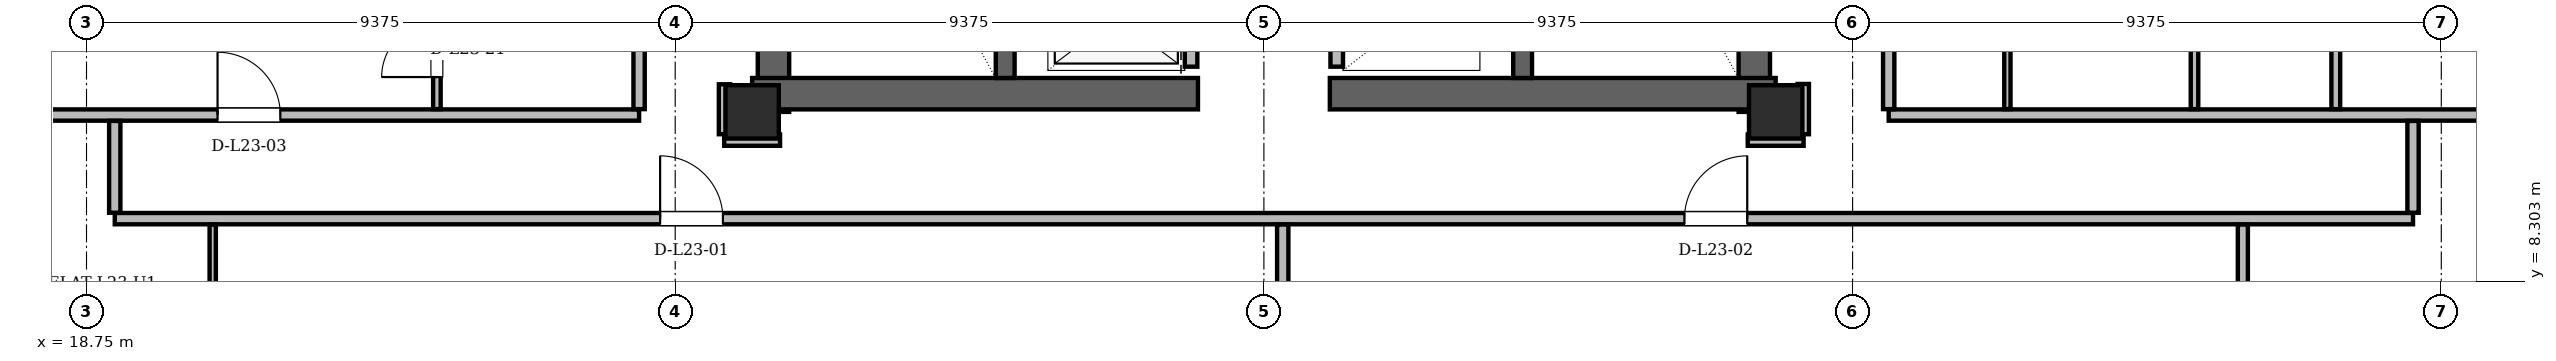
"""IFC4 building model, lengths in metres.
Left out: names, types, materials, properties, quantities, classifications, styles, units other than length and angle.
Written with IfcOpenShell. Run it as: python <this file> out.ifc"""

import sys

from ifc_helpers import new_model, si_unit, direction, frame, frame_2d, origin, origin_2d, place, context, subcontext, project, spatial, rectangle, hollow_rectangle, extrude, element, fill, save


model = new_model("IFC4")
c1 = context("Model", 3, precision=1e-05, world=origin(), true_north=direction((0.0, 1.0)))
c2 = subcontext(c1, "Body", "Model", "MODEL_VIEW")
j1 = project(units=[si_unit("LENGTHUNIT", "METRE"), si_unit("PLANEANGLEUNIT", "RADIAN")], contexts=[c1])
p1 = place(None, origin())
s1 = spatial("IfcSite", under=j1, at=p1, CompositionType="ELEMENT")
p2 = place(p1, origin())
s2 = spatial("IfcBuilding", under=s1, at=p2, CompositionType="ELEMENT")
p3 = place(p2, frame((0.0, 0.0, 89.7)))
s3 = spatial("IfcBuildingStorey", under=s2, at=p3, CompositionType="ELEMENT", Elevation=89.7)
for number, where, z_axis, x_axis in (
    (1, (29.35, 11.0, 0.0), (0.0, 0.0, 1.0), (1.0, 0.0, 0.0)),
    (2, (45.65, 11.0, 0.0), (0.0, 0.0, 1.0), (1.0, 0.0, 0.0)),
):
    element("IfcColumn", number, at=place(p3, frame(where, z_axis=z_axis, x_axis=x_axis)), inside=s3, PredefinedType="COLUMN", context=c2, shape_type="SweptSolid", body=[
        extrude(hollow_rectangle(XDim=0.85, YDim=0.85, WallThickness=0.07, at=origin_2d()), origin(), (0.0, 0.0, 1.0), 3.6),
    ])
for number, where, z_axis, x_axis in (
    (3, (29.69, 11.0, 0.0), (0.0, 0.0, 1.0), (0.0, 1.0, 0.0)),
    (4, (45.31, 11.0, 0.0), (0.0, 0.0, 1.0), (0.0, 1.0, 0.0)),
):
    element("IfcWall", number, at=place(p3, frame(where, z_axis=z_axis, x_axis=x_axis)), inside=s3, PredefinedType="SHEAR", context=c2, shape_type="SweptSolid", body=[
        extrude(rectangle(XDim=13.3, YDim=0.5, at=frame_2d((6.65, 0.0))), origin(), (0.0, 0.0, 1.0), 3.36),
    ])
for number, where, z_axis, x_axis in (
    (5, (29.35, 11.29, 0.0), (0.0, 0.0, 1.0), (1.0, 0.0, 0.0)),
    (6, (38.55, 11.29, 0.0), (0.0, 0.0, 1.0), (1.0, 0.0, 0.0)),
):
    element("IfcWall", number, at=place(p3, frame(where, z_axis=z_axis, x_axis=x_axis)), inside=s3, PredefinedType="SHEAR", context=c2, shape_type="SweptSolid", body=[
        extrude(rectangle(XDim=7.1, YDim=0.5, at=frame_2d((3.55, 0.0))), origin(), (0.0, 0.0, 1.0), 3.36),
    ])
for number, where, z_axis, x_axis in (
    (7, (33.38, 11.54, 0.0), (0.0, 0.0, 1.0), (0.0, 1.0, 0.0)),
    (8, (41.62, 11.54, 0.0), (0.0, 0.0, 1.0), (0.0, 1.0, 0.0)),
):
    element("IfcWall", number, at=place(p3, frame(where, z_axis=z_axis, x_axis=x_axis)), inside=s3, PredefinedType="SHEAR", context=c2, shape_type="SweptSolid", body=[
        extrude(rectangle(XDim=7.62, YDim=0.3, at=frame_2d((3.81, 0.0))), origin(), (0.0, 0.0, 1.0), 3.36),
    ])
for number, where, z_axis, x_axis in (
    (9, (14.14, 13.798, 0.0), (0.0, 0.0, 1.0), (0.5, -0.866, 0.0)),
    (10, (54.637, 3.021, 0.0), (0.0, 0.0, 1.0), (0.5, 0.866, 0.0)),
):
    element("IfcWall", number, at=place(p3, frame(where, z_axis=z_axis, x_axis=x_axis)), inside=s3, PredefinedType="SOLIDWALL", context=c2, shape_type="SweptSolid", body=[
        extrude(rectangle(XDim=12.445, YDim=0.34, at=frame_2d((6.223, 0.0))), origin(), (0.0, 0.0, 1.0), 2.578),
    ])
p4 = place(p3, frame((36.34, 11.72, 0.0), z_axis=(0.0, 0.0, 1.0), x_axis=(0.0, 1.0, 0.0)))
e11 = element("IfcWall", 11, at=p4, inside=s3, PredefinedType="PARTITIONING", context=c2, shape_type="SweptSolid", body=[
    extrude(rectangle(XDim=7.6, YDim=0.2, at=frame_2d((3.8, 0.0))), origin(), (0.0, 0.0, 1.0), 3.36),
])
p5 = place(p4, frame((0.255, 0.0, 0.0)))
e12 = element("IfcOpeningElement", 12, at=p5, cuts=e11, PredefinedType="OPENING", context=c2, shape_type="SweptSolid", body=[
    extrude(rectangle(XDim=1.05, YDim=2.15, at=frame_2d((0.525, 1.075))), frame((0.0, 0.1, 0.0), z_axis=(0.0, -1.0, 0.0), x_axis=(1.0, 0.0, 0.0)), (0.0, 0.0, 1.0), 0.2),
])
p6 = place(p4, frame((2.105, 0.0, 0.0)))
e13 = element("IfcOpeningElement", 13, at=p6, cuts=e11, PredefinedType="OPENING", context=c2, shape_type="SweptSolid", body=[
    extrude(rectangle(XDim=1.05, YDim=2.15, at=frame_2d((0.525, 1.075))), frame((0.0, 0.1, 0.0), z_axis=(0.0, -1.0, 0.0), x_axis=(1.0, 0.0, 0.0)), (0.0, 0.0, 1.0), 0.2),
])
p7 = place(p4, frame((3.955, 0.0, 0.0)))
e14 = element("IfcOpeningElement", 14, at=p7, cuts=e11, PredefinedType="OPENING", context=c2, shape_type="SweptSolid", body=[
    extrude(rectangle(XDim=1.05, YDim=2.15, at=frame_2d((0.525, 1.075))), frame((0.0, 0.1, 0.0), z_axis=(0.0, -1.0, 0.0), x_axis=(1.0, 0.0, 0.0)), (0.0, 0.0, 1.0), 0.2),
])
p8 = place(p3, frame((38.66, 11.72, 0.0), z_axis=(0.0, 0.0, 1.0), x_axis=(0.0, 1.0, 0.0)))
e15 = element("IfcWall", 15, at=p8, inside=s3, PredefinedType="PARTITIONING", context=c2, shape_type="SweptSolid", body=[
    extrude(rectangle(XDim=9.1, YDim=0.2, at=frame_2d((4.55, 0.0))), origin(), (0.0, 0.0, 1.0), 3.36),
])
p9 = place(p3, frame((19.2, 9.3, 0.0), z_axis=(0.0, 0.0, 1.0), x_axis=(1.0, 0.0, 0.0)))
e16 = element("IfcWall", 16, at=p9, inside=s3, PredefinedType="PARTITIONING", context=c2, shape_type="SweptSolid", body=[
    extrude(rectangle(XDim=36.6, YDim=0.18, at=frame_2d((18.3, 0.0))), origin(), (0.0, 0.0, 1.0), 2.814),
])
p10 = place(p9, frame((8.685, 0.0, 0.0)))
e17 = element("IfcOpeningElement", 17, at=p10, cuts=e16, PredefinedType="OPENING", context=c2, shape_type="SweptSolid", body=[
    extrude(rectangle(XDim=1.0, YDim=2.18, at=frame_2d((0.5, 1.09))), frame((0.0, 0.09, 0.0), z_axis=(0.0, -1.0, 0.0), x_axis=(1.0, 0.0, 0.0)), (0.0, 0.0, 1.0), 0.18),
])
p11 = place(p9, frame((24.997, 0.0, 0.0)))
e18 = element("IfcOpeningElement", 18, at=p11, cuts=e16, PredefinedType="OPENING", context=c2, shape_type="SweptSolid", body=[
    extrude(rectangle(XDim=1.0, YDim=2.18, at=frame_2d((0.5, 1.09))), frame((0.0, 0.09, 0.0), z_axis=(0.0, -1.0, 0.0), x_axis=(1.0, 0.0, 0.0)), (0.0, 0.0, 1.0), 0.18),
])
for number, where, z_axis, x_axis in (
    (19, (28.905, 10.55, 0.0), (0.0, 0.0, 1.0), (1.0, 0.0, 0.0)),
    (20, (45.205, 10.55, 0.0), (0.0, 0.0, 1.0), (1.0, 0.0, 0.0)),
):
    element("IfcWall", number, at=place(p3, frame(where, z_axis=z_axis, x_axis=x_axis)), inside=s3, PredefinedType="PARTITIONING", context=c2, shape_type="SweptSolid", body=[
        extrude(rectangle(XDim=0.89, YDim=0.18, at=frame_2d((0.445, 0.0))), origin(), (0.0, 0.0, 1.0), 3.36),
    ])
p12 = place(p3, frame((15.986, 10.95, 0.0), z_axis=(0.0, 0.0, 1.0), x_axis=(1.0, 0.0, 0.0)))
e21 = element("IfcWall", 21, at=p12, inside=s3, PredefinedType="PARTITIONING", context=c2, shape_type="SweptSolid", body=[
    extrude(rectangle(XDim=11.564, YDim=0.18, at=frame_2d((5.782, 0.0))), origin(), (0.0, 0.0, 1.0), 3.36),
])
p13 = place(p12, frame((4.851, 0.0, 0.0)))
e22 = element("IfcOpeningElement", 22, at=p13, cuts=e21, PredefinedType="OPENING", context=c2, shape_type="SweptSolid", body=[
    extrude(rectangle(XDim=1.0, YDim=2.18, at=frame_2d((0.5, 1.09))), frame((0.0, 0.09, 0.0), z_axis=(0.0, -1.0, 0.0), x_axis=(1.0, 0.0, 0.0)), (0.0, 0.0, 1.0), 0.18),
])
p14 = place(p3, frame((47.45, 10.95, 0.0), z_axis=(0.0, 0.0, 1.0), x_axis=(1.0, 0.0, 0.0)))
e23 = element("IfcWall", 23, at=p14, inside=s3, PredefinedType="PARTITIONING", context=c2, shape_type="SweptSolid", body=[
    extrude(rectangle(XDim=11.564, YDim=0.18, at=frame_2d((5.782, 0.0))), origin(), (0.0, 0.0, 1.0), 3.36),
])
p15 = place(p3, frame((19.2, 9.394, 0.0), z_axis=(0.0, 0.0, 1.0), x_axis=(0.0, 1.0, 0.0)))
e24 = element("IfcWall", 24, at=p15, inside=s3, PredefinedType="PARTITIONING", context=c2, shape_type="SweptSolid", body=[
    extrude(rectangle(XDim=1.462, YDim=0.18, at=frame_2d((0.731, 0.0))), origin(), (0.0, 0.0, 1.0), 3.36),
])
p16 = place(p3, frame((20.76, 3.195, 0.0), z_axis=(0.0, 0.0, 1.0), x_axis=(0.0, 1.0, 0.0)))
e25 = element("IfcWall", 25, at=p16, inside=s3, PredefinedType="PARTITIONING", context=c2, shape_type="SweptSolid", body=[
    extrude(rectangle(XDim=6.011, YDim=0.1, at=frame_2d((3.006, 0.0))), origin(), (0.0, 0.0, 1.0), 2.814),
])
p17 = place(p16, frame((2.601, 0.0, 0.0)))
e26 = element("IfcOpeningElement", 26, at=p17, cuts=e25, PredefinedType="OPENING", context=c2, shape_type="SweptSolid", body=[
    extrude(rectangle(XDim=0.88, YDim=2.08, at=frame_2d((0.44, 1.04))), frame((0.0, 0.05, 0.0), z_axis=(0.0, -1.0, 0.0), x_axis=(1.0, 0.0, 0.0)), (0.0, 0.0, 1.0), 0.1),
])
p18 = place(p3, frame((24.33, 11.044, 0.0), z_axis=(0.0, 0.0, 1.0), x_axis=(0.0, 1.0, 0.0)))
e27 = element("IfcWall", 27, at=p18, inside=s3, PredefinedType="PARTITIONING", context=c2, shape_type="SweptSolid", body=[
    extrude(rectangle(XDim=4.862, YDim=0.12, at=frame_2d((2.431, 0.0))), origin(), (0.0, 0.0, 1.0), 2.814),
])
p19 = place(p18, frame((0.511, 0.0, 0.0)))
e28 = element("IfcOpeningElement", 28, at=p19, cuts=e27, PredefinedType="OPENING", context=c2, shape_type="SweptSolid", body=[
    extrude(rectangle(XDim=0.88, YDim=2.08, at=frame_2d((0.44, 1.04))), frame((0.0, 0.06, 0.0), z_axis=(0.0, -1.0, 0.0), x_axis=(1.0, 0.0, 0.0)), (0.0, 0.0, 1.0), 0.12),
])
p20 = place(p18, frame((3.031, 0.0, 0.0)))
e29 = element("IfcOpeningElement", 29, at=p20, cuts=e27, PredefinedType="OPENING", context=c2, shape_type="SweptSolid", body=[
    extrude(rectangle(XDim=0.95, YDim=2.1, at=frame_2d((0.475, 1.05))), frame((0.0, 0.06, 0.0), z_axis=(0.0, -1.0, 0.0), x_axis=(1.0, 0.0, 0.0)), (0.0, 0.0, 1.0), 0.12),
])
p21 = place(p3, frame((27.55, 11.044, 0.0), z_axis=(0.0, 0.0, 1.0), x_axis=(0.0, 1.0, 0.0)))
e30 = element("IfcWall", 30, at=p21, inside=s3, PredefinedType="PARTITIONING", context=c2, shape_type="SweptSolid", body=[
    extrude(rectangle(XDim=14.832, YDim=0.18, at=frame_2d((7.416, 0.0))), origin(), (0.0, 0.0, 1.0), 2.814),
])
p22 = place(p21, frame((6.208, 0.0, 0.0)))
e31 = element("IfcOpeningElement", 31, at=p22, cuts=e30, PredefinedType="OPENING", context=c2, shape_type="SweptSolid", body=[
    extrude(rectangle(XDim=1.0, YDim=2.18, at=frame_2d((0.5, 1.09))), frame((0.0, 0.09, 0.0), z_axis=(0.0, -1.0, 0.0), x_axis=(1.0, 0.0, 0.0)), (0.0, 0.0, 1.0), 0.18),
])
p23 = place(p3, frame((28.91, 10.644, 0.0), z_axis=(0.0, 0.0, 1.0), x_axis=(0.0, 1.0, 0.0)))
e32 = element("IfcWall", 32, at=p23, inside=s3, PredefinedType="PARTITIONING", context=c2, shape_type="SweptSolid", body=[
    extrude(rectangle(XDim=0.796, YDim=0.18, at=frame_2d((0.398, 0.0))), origin(), (0.0, 0.0, 1.0), 2.814),
])
p24 = place(p3, frame((37.8, 3.195, 0.0), z_axis=(0.0, 0.0, 1.0), x_axis=(0.0, 1.0, 0.0)))
e33 = element("IfcWall", 33, at=p24, inside=s3, PredefinedType="PARTITIONING", context=c2, shape_type="SweptSolid", body=[
    extrude(rectangle(XDim=6.011, YDim=0.18, at=frame_2d((3.006, 0.0))), origin(), (0.0, 0.0, 1.0), 3.36),
])
p25 = place(p3, frame((46.09, 10.644, 0.0), z_axis=(0.0, 0.0, 1.0), x_axis=(0.0, 1.0, 0.0)))
e34 = element("IfcWall", 34, at=p25, inside=s3, PredefinedType="PARTITIONING", context=c2, shape_type="SweptSolid", body=[
    extrude(rectangle(XDim=0.801, YDim=0.18, at=frame_2d((0.4, 0.0))), origin(), (0.0, 0.0, 1.0), 2.814),
])
p26 = place(p3, frame((47.45, 11.044, 0.0), z_axis=(0.0, 0.0, 1.0), x_axis=(0.0, 1.0, 0.0)))
e35 = element("IfcWall", 35, at=p26, inside=s3, PredefinedType="PARTITIONING", context=c2, shape_type="SweptSolid", body=[
    extrude(rectangle(XDim=14.832, YDim=0.18, at=frame_2d((7.416, 0.0))), origin(), (0.0, 0.0, 1.0), 2.814),
])
p27 = place(p26, frame((4.578, 0.0, 0.0)))
e36 = element("IfcOpeningElement", 36, at=p27, cuts=e35, PredefinedType="OPENING", context=c2, shape_type="SweptSolid", body=[
    extrude(rectangle(XDim=1.0, YDim=2.18, at=frame_2d((0.5, 1.09))), frame((0.0, 0.09, 0.0), z_axis=(0.0, -1.0, 0.0), x_axis=(1.0, 0.0, 0.0)), (0.0, 0.0, 1.0), 0.18),
])
p28 = place(p26, frame((9.09, 0.0, 0.0)))
e37 = element("IfcOpeningElement", 37, at=p28, cuts=e35, PredefinedType="OPENING", context=c2, shape_type="SweptSolid", body=[
    extrude(rectangle(XDim=1.0, YDim=2.18, at=frame_2d((0.5, 1.09))), frame((0.0, 0.09, 0.0), z_axis=(0.0, -1.0, 0.0), x_axis=(1.0, 0.0, 0.0)), (0.0, 0.0, 1.0), 0.18),
])
p29 = place(p26, frame((13.539, 0.0, 0.0)))
e38 = element("IfcOpeningElement", 38, at=p29, cuts=e35, PredefinedType="OPENING", context=c2, shape_type="SweptSolid", body=[
    extrude(rectangle(XDim=1.0, YDim=2.18, at=frame_2d((0.5, 1.09))), frame((0.0, 0.09, 0.0), z_axis=(0.0, -1.0, 0.0), x_axis=(1.0, 0.0, 0.0)), (0.0, 0.0, 1.0), 0.18),
])
p30 = place(p3, frame((49.34, 11.044, 0.0), z_axis=(0.0, 0.0, 1.0), x_axis=(0.0, 1.0, 0.0)))
e39 = element("IfcWall", 39, at=p30, inside=s3, PredefinedType="PARTITIONING", context=c2, shape_type="SweptSolid", body=[
    extrude(rectangle(XDim=2.792, YDim=0.1, at=frame_2d((1.396, 0.0))), origin(), (0.0, 0.0, 1.0), 2.814),
])
p31 = place(p3, frame((52.32, 11.044, 0.0), z_axis=(0.0, 0.0, 1.0), x_axis=(0.0, 1.0, 0.0)))
e40 = element("IfcWall", 40, at=p31, inside=s3, PredefinedType="PARTITIONING", context=c2, shape_type="SweptSolid", body=[
    extrude(rectangle(XDim=2.792, YDim=0.12, at=frame_2d((1.396, 0.0))), origin(), (0.0, 0.0, 1.0), 2.814),
])
p32 = place(p3, frame((53.09, 3.195, 0.0), z_axis=(0.0, 0.0, 1.0), x_axis=(0.0, 1.0, 0.0)))
e41 = element("IfcWall", 41, at=p32, inside=s3, PredefinedType="PARTITIONING", context=c2, shape_type="SweptSolid", body=[
    extrude(rectangle(XDim=6.011, YDim=0.16, at=frame_2d((3.006, 0.0))), origin(), (0.0, 0.0, 1.0), 2.814),
])
p33 = place(p32, frame((2.601, 0.0, 0.0)))
e42 = element("IfcOpeningElement", 42, at=p33, cuts=e41, PredefinedType="OPENING", context=c2, shape_type="SweptSolid", body=[
    extrude(rectangle(XDim=0.88, YDim=2.08, at=frame_2d((0.44, 1.04))), frame((0.0, 0.08, 0.0), z_axis=(0.0, -1.0, 0.0), x_axis=(1.0, 0.0, 0.0)), (0.0, 0.0, 1.0), 0.16),
])
p34 = place(p3, frame((54.57, 11.044, 0.0), z_axis=(0.0, 0.0, 1.0), x_axis=(0.0, 1.0, 0.0)))
e43 = element("IfcWall", 43, at=p34, inside=s3, PredefinedType="PARTITIONING", context=c2, shape_type="SweptSolid", body=[
    extrude(rectangle(XDim=2.792, YDim=0.14, at=frame_2d((1.396, 0.0))), origin(), (0.0, 0.0, 1.0), 2.814),
])
p35 = place(p3, frame((55.8, 9.394, 0.0), z_axis=(0.0, 0.0, 1.0), x_axis=(0.0, 1.0, 0.0)))
e44 = element("IfcWall", 44, at=p35, inside=s3, PredefinedType="PARTITIONING", context=c2, shape_type="SweptSolid", body=[
    extrude(rectangle(XDim=1.462, YDim=0.18, at=frame_2d((0.731, 0.0))), origin(), (0.0, 0.0, 1.0), 3.36),
])
p36 = place(p10, origin())
e45 = element("IfcDoor", 45, at=p36, inside=s3, OperationType="SINGLE_SWING_LEFT", PredefinedType="DOOR", context=c2, shape_type="SweptSolid", body=[
    extrude(rectangle(XDim=1.0, YDim=2.18, at=frame_2d((0.5, 1.09))), frame((0.0, 0.025, 0.0), z_axis=(0.0, -1.0, 0.0), x_axis=(1.0, 0.0, 0.0)), (0.0, 0.0, 1.0), 0.05),
])
fill(e17, e45)
p37 = place(p11, origin())
e46 = element("IfcDoor", 46, at=p37, inside=s3, OperationType="SINGLE_SWING_RIGHT", PredefinedType="DOOR", context=c2, shape_type="SweptSolid", body=[
    extrude(rectangle(XDim=1.0, YDim=2.18, at=frame_2d((0.5, 1.09))), frame((0.0, 0.025, 0.0), z_axis=(0.0, -1.0, 0.0), x_axis=(1.0, 0.0, 0.0)), (0.0, 0.0, 1.0), 0.05),
])
fill(e18, e46)
p38 = place(p13, origin())
e47 = element("IfcDoor", 47, at=p38, inside=s3, OperationType="SINGLE_SWING_LEFT", PredefinedType="DOOR", context=c2, shape_type="SweptSolid", body=[
    extrude(rectangle(XDim=1.0, YDim=2.18, at=frame_2d((0.5, 1.09))), frame((0.0, 0.025, 0.0), z_axis=(0.0, -1.0, 0.0), x_axis=(1.0, 0.0, 0.0)), (0.0, 0.0, 1.0), 0.05),
])
fill(e22, e47)
p39 = place(p19, origin())
e48 = element("IfcDoor", 48, at=p39, inside=s3, OperationType="SINGLE_SWING_LEFT", PredefinedType="DOOR", context=c2, shape_type="SweptSolid", body=[
    extrude(rectangle(XDim=0.88, YDim=2.08, at=frame_2d((0.44, 1.04))), frame((0.0, 0.025, 0.0), z_axis=(0.0, -1.0, 0.0), x_axis=(1.0, 0.0, 0.0)), (0.0, 0.0, 1.0), 0.05),
])
fill(e28, e48)
save(model, sys.argv[1])
